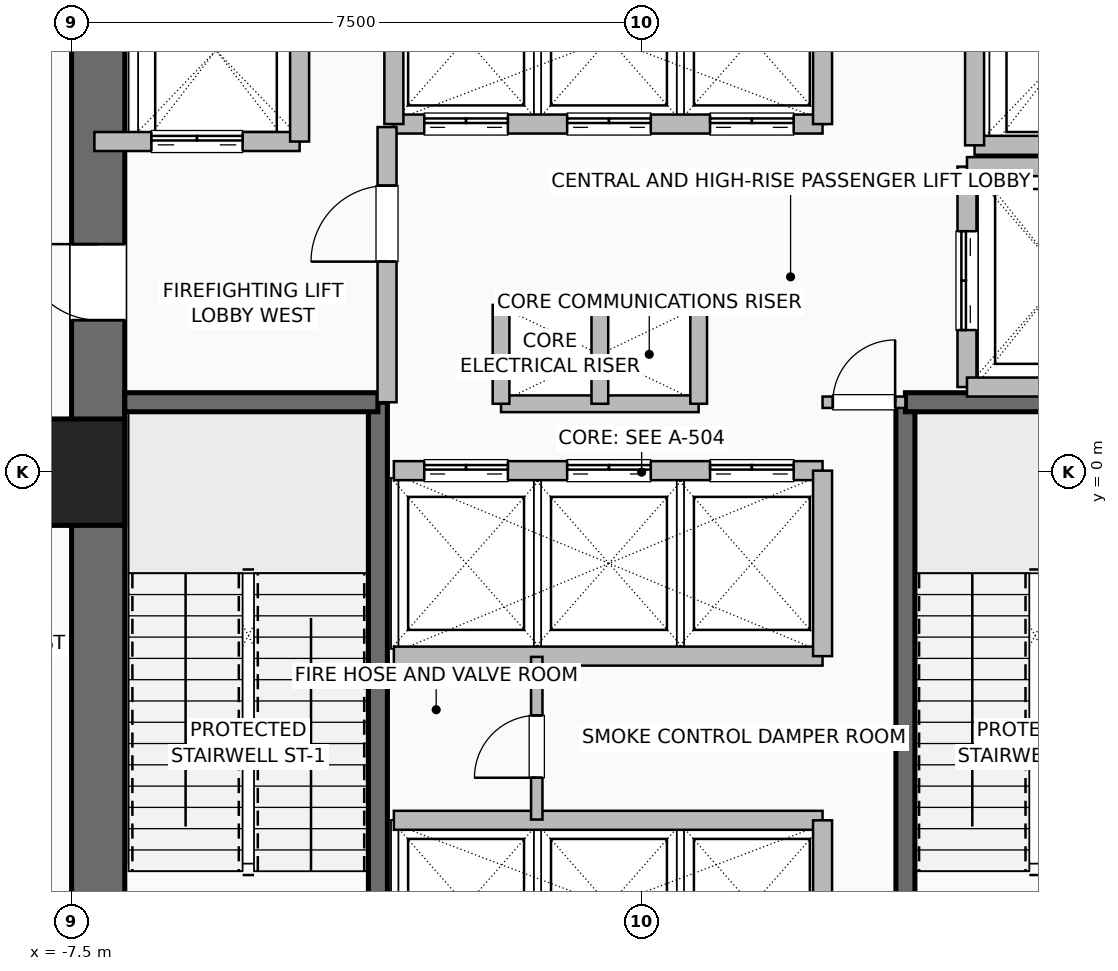
"""IFC4 building model, lengths in metres.
Left out: names, types, materials, properties, quantities, classifications, styles, units other than length and angle.
Written with IfcOpenShell. Run it as: python <this file> out.ifc"""

import sys

from ifc_helpers import new_model, si_unit, direction, frame, frame_2d, origin, origin_2d, place, context, subcontext, project, spatial, rectangle, hollow_rectangle, extrude, element, fill, save


model = new_model("IFC4")
c1 = context("Model", 3, precision=1e-05, world=origin(), true_north=direction((0.0, 1.0)))
c2 = subcontext(c1, "Body", "Model", "MODEL_VIEW")
j1 = project(units=[si_unit("LENGTHUNIT", "METRE"), si_unit("PLANEANGLEUNIT", "RADIAN")], contexts=[c1])
p1 = place(None, origin())
s1 = spatial("IfcSite", under=j1, at=p1, CompositionType="ELEMENT")
p2 = place(p1, origin())
s2 = spatial("IfcBuilding", under=s1, at=p2, CompositionType="ELEMENT")
p3 = place(p2, frame((0.0, 0.0, 5.4)))
s3 = spatial("IfcBuildingStorey", under=s2, at=p3, CompositionType="ELEMENT", Elevation=5.4)
p4 = place(p3, frame((-7.5, 0.0, 0.0), z_axis=(0.0, 0.0, 1.0), x_axis=(1.0, 0.0, 0.0)))
e1 = element("IfcColumn", 1, at=p4, inside=s3, PredefinedType="COLUMN", context=c2, shape_type="SweptSolid", body=[
    extrude(hollow_rectangle(XDim=1.4, YDim=1.4, WallThickness=0.06, at=origin_2d()), origin(), (0.0, 0.0, 1.0), 5.4),
])
p5 = place(p3, frame((-7.15, -7.5, 0.0), z_axis=(0.0, 0.0, 1.0), x_axis=(0.0, 1.0, 0.0)))
e2 = element("IfcWall", 2, at=p5, inside=s3, PredefinedType="SHEAR", context=c2, shape_type="SweptSolid", body=[
    extrude(rectangle(XDim=15.0, YDim=0.7, at=frame_2d((7.5, 0.0))), origin(), (0.0, 0.0, 1.0), 5.0),
])
p6 = place(p5, frame((9.5, 0.0, 0.0)))
e3 = element("IfcOpeningElement", 3, at=p6, cuts=e2, PredefinedType="OPENING", context=c2, shape_type="SweptSolid", body=[
    extrude(rectangle(XDim=1.0, YDim=2.08, at=frame_2d((0.5, 1.04))), frame((0.0, 0.36, 0.0), z_axis=(0.0, -1.0, 0.0), x_axis=(1.0, 0.0, 0.0)), (0.0, 0.0, 1.0), 0.72),
])
p7 = place(p3, frame((-3.47, -6.8, 0.0), z_axis=(0.0, 0.0, 1.0), x_axis=(0.0, 1.0, 0.0)))
e4 = element("IfcWall", 4, at=p7, inside=s3, PredefinedType="SHEAR", context=c2, shape_type="SweptSolid", body=[
    extrude(rectangle(XDim=7.72, YDim=0.25, at=frame_2d((3.86, 0.0))), origin(), (0.0, 0.0, 1.0), 5.0),
])
p8 = place(p3, frame((-6.8, 0.92, 0.0), z_axis=(0.0, 0.0, 1.0), x_axis=(1.0, 0.0, 0.0)))
e5 = element("IfcWall", 5, at=p8, inside=s3, PredefinedType="SHEAR", context=c2, shape_type="SweptSolid", body=[
    extrude(rectangle(XDim=3.33, YDim=0.25, at=frame_2d((1.665, 0.0))), origin(), (0.0, 0.0, 1.0), 5.0),
])
p9 = place(p3, frame((3.47, -6.8, 0.0), z_axis=(0.0, 0.0, 1.0), x_axis=(0.0, 1.0, 0.0)))
e6 = element("IfcWall", 6, at=p9, inside=s3, PredefinedType="SHEAR", context=c2, shape_type="SweptSolid", body=[
    extrude(rectangle(XDim=7.72, YDim=0.25, at=frame_2d((3.86, 0.0))), origin(), (0.0, 0.0, 1.0), 5.0),
])
p10 = place(p3, frame((3.47, 0.92, 0.0), z_axis=(0.0, 0.0, 1.0), x_axis=(1.0, 0.0, 0.0)))
e7 = element("IfcWall", 7, at=p10, inside=s3, PredefinedType="SHEAR", context=c2, shape_type="SweptSolid", body=[
    extrude(rectangle(XDim=3.33, YDim=0.25, at=frame_2d((1.665, 0.0))), origin(), (0.0, 0.0, 1.0), 5.0),
])
for number, where, z_axis, x_axis in (
    (8, (-1.85, 2.2, 0.0), (0.0, 0.0, 1.0), (1.0, 0.0, 0.0)),
    (9, (-1.85, 0.9, 0.0), (0.0, 0.0, 1.0), (1.0, 0.0, 0.0)),
):
    element("IfcWall", number, at=place(p3, frame(where, z_axis=z_axis, x_axis=x_axis)), inside=s3, PredefinedType="PARTITIONING", context=c2, shape_type="SweptSolid", body=[
        extrude(rectangle(XDim=2.6, YDim=0.22, at=frame_2d((1.3, 0.0))), origin(), (0.0, 0.0, 1.0), 5.0),
    ])
for number, where, z_axis, x_axis in (
    (10, (-0.55, 0.9, 0.0), (0.0, 0.0, 1.0), (0.0, 1.0, 0.0)),
    (11, (0.75, 0.9, 0.0), (0.0, 0.0, 1.0), (0.0, 1.0, 0.0)),
    (12, (-1.85, 0.9, 0.0), (0.0, 0.0, 1.0), (0.0, 1.0, 0.0)),
):
    element("IfcWall", number, at=place(p3, frame(where, z_axis=z_axis, x_axis=x_axis)), inside=s3, PredefinedType="PARTITIONING", context=c2, shape_type="SweptSolid", body=[
        extrude(rectangle(XDim=1.3, YDim=0.22, at=frame_2d((0.65, 0.0))), origin(), (0.0, 0.0, 1.0), 5.0),
    ])
p11 = place(p3, frame((-3.26, -4.58, 0.0), z_axis=(0.0, 0.0, 1.0), x_axis=(1.0, 0.0, 0.0)))
e13 = element("IfcWall", 13, at=p11, inside=s3, PredefinedType="SHEAR", context=c2, shape_type="SweptSolid", body=[
    extrude(rectangle(XDim=5.64, YDim=0.25, at=frame_2d((2.82, 0.0))), origin(), (0.0, 0.0, 1.0), 5.0),
])
p12 = place(p3, frame((2.38, -6.8, 0.0), z_axis=(0.0, 0.0, 1.0), x_axis=(0.0, 1.0, 0.0)))
e14 = element("IfcWall", 14, at=p12, inside=s3, PredefinedType="SHEAR", context=c2, shape_type="SweptSolid", body=[
    extrude(rectangle(XDim=2.22, YDim=0.25, at=frame_2d((1.11, 0.0))), origin(), (0.0, 0.0, 1.0), 5.0),
])
p13 = place(p3, frame((-3.26, 0.02, 0.0), z_axis=(0.0, 0.0, 1.0), x_axis=(1.0, 0.0, 0.0)))
e15 = element("IfcWall", 15, at=p13, inside=s3, PredefinedType="SHEAR", context=c2, shape_type="SweptSolid", body=[
    extrude(rectangle(XDim=5.64, YDim=0.25, at=frame_2d((2.82, 0.0))), origin(), (0.0, 0.0, 1.0), 5.0),
])
p14 = place(p13, frame((0.4, 0.0, 0.0)))
e16 = element("IfcOpeningElement", 16, at=p14, cuts=e15, PredefinedType="OPENING", context=c2, shape_type="SweptSolid", body=[
    extrude(rectangle(XDim=1.1, YDim=2.2, at=frame_2d((0.55, 1.1))), frame((0.0, 0.135, 0.0), z_axis=(0.0, -1.0, 0.0), x_axis=(1.0, 0.0, 0.0)), (0.0, 0.0, 1.0), 0.27),
])
p15 = place(p13, frame((2.28, 0.0, 0.0)))
e17 = element("IfcOpeningElement", 17, at=p15, cuts=e15, PredefinedType="OPENING", context=c2, shape_type="SweptSolid", body=[
    extrude(rectangle(XDim=1.1, YDim=2.2, at=frame_2d((0.55, 1.1))), frame((0.0, 0.135, 0.0), z_axis=(0.0, -1.0, 0.0), x_axis=(1.0, 0.0, 0.0)), (0.0, 0.0, 1.0), 0.27),
])
p16 = place(p13, frame((4.16, 0.0, 0.0)))
e18 = element("IfcOpeningElement", 18, at=p16, cuts=e15, PredefinedType="OPENING", context=c2, shape_type="SweptSolid", body=[
    extrude(rectangle(XDim=1.1, YDim=2.2, at=frame_2d((0.55, 1.1))), frame((0.0, 0.135, 0.0), z_axis=(0.0, -1.0, 0.0), x_axis=(1.0, 0.0, 0.0)), (0.0, 0.0, 1.0), 0.27),
])
p17 = place(p3, frame((-3.26, -2.42, 0.0), z_axis=(0.0, 0.0, 1.0), x_axis=(1.0, 0.0, 0.0)))
e19 = element("IfcWall", 19, at=p17, inside=s3, PredefinedType="SHEAR", context=c2, shape_type="SweptSolid", body=[
    extrude(rectangle(XDim=5.64, YDim=0.25, at=frame_2d((2.82, 0.0))), origin(), (0.0, 0.0, 1.0), 5.0),
])
p18 = place(p3, frame((2.38, -2.42, 0.0), z_axis=(0.0, 0.0, 1.0), x_axis=(0.0, 1.0, 0.0)))
e20 = element("IfcWall", 20, at=p18, inside=s3, PredefinedType="SHEAR", context=c2, shape_type="SweptSolid", body=[
    extrude(rectangle(XDim=2.44, YDim=0.25, at=frame_2d((1.22, 0.0))), origin(), (0.0, 0.0, 1.0), 5.0),
])
p19 = place(p3, frame((-3.26, 4.58, 0.0), z_axis=(0.0, 0.0, 1.0), x_axis=(1.0, 0.0, 0.0)))
e21 = element("IfcWall", 21, at=p19, inside=s3, PredefinedType="SHEAR", context=c2, shape_type="SweptSolid", body=[
    extrude(rectangle(XDim=5.64, YDim=0.25, at=frame_2d((2.82, 0.0))), origin(), (0.0, 0.0, 1.0), 5.0),
])
p20 = place(p19, frame((0.4, 0.0, 0.0)))
e22 = element("IfcOpeningElement", 22, at=p20, cuts=e21, PredefinedType="OPENING", context=c2, shape_type="SweptSolid", body=[
    extrude(rectangle(XDim=1.1, YDim=2.2, at=frame_2d((0.55, 1.1))), frame((0.0, 0.135, 0.0), z_axis=(0.0, -1.0, 0.0), x_axis=(1.0, 0.0, 0.0)), (0.0, 0.0, 1.0), 0.27),
])
p21 = place(p19, frame((2.28, 0.0, 0.0)))
e23 = element("IfcOpeningElement", 23, at=p21, cuts=e21, PredefinedType="OPENING", context=c2, shape_type="SweptSolid", body=[
    extrude(rectangle(XDim=1.1, YDim=2.2, at=frame_2d((0.55, 1.1))), frame((0.0, 0.135, 0.0), z_axis=(0.0, -1.0, 0.0), x_axis=(1.0, 0.0, 0.0)), (0.0, 0.0, 1.0), 0.27),
])
p22 = place(p19, frame((4.16, 0.0, 0.0)))
e24 = element("IfcOpeningElement", 24, at=p22, cuts=e21, PredefinedType="OPENING", context=c2, shape_type="SweptSolid", body=[
    extrude(rectangle(XDim=1.1, YDim=2.2, at=frame_2d((0.55, 1.1))), frame((0.0, 0.135, 0.0), z_axis=(0.0, -1.0, 0.0), x_axis=(1.0, 0.0, 0.0)), (0.0, 0.0, 1.0), 0.27),
])
for number, where, z_axis, x_axis in (
    (25, (-3.26, 4.58, 0.0), (0.0, 0.0, 1.0), (0.0, 1.0, 0.0)),
    (26, (2.38, 4.58, 0.0), (0.0, 0.0, 1.0), (0.0, 1.0, 0.0)),
):
    element("IfcWall", number, at=place(p3, frame(where, z_axis=z_axis, x_axis=x_axis)), inside=s3, PredefinedType="SHEAR", context=c2, shape_type="SweptSolid", body=[
        extrude(rectangle(XDim=2.22, YDim=0.25, at=frame_2d((1.11, 0.0))), origin(), (0.0, 0.0, 1.0), 5.0),
    ])
p23 = place(p3, frame((-7.2, 4.35, 0.0), z_axis=(0.0, 0.0, 1.0), x_axis=(1.0, 0.0, 0.0)))
e27 = element("IfcWall", 27, at=p23, inside=s3, PredefinedType="SHEAR", context=c2, shape_type="SweptSolid", body=[
    extrude(rectangle(XDim=2.7, YDim=0.25, at=frame_2d((1.35, 0.0))), origin(), (0.0, 0.0, 1.0), 5.0),
])
p24 = place(p23, frame((0.75, 0.0, 0.0)))
e28 = element("IfcOpeningElement", 28, at=p24, cuts=e27, PredefinedType="OPENING", context=c2, shape_type="SweptSolid", body=[
    extrude(rectangle(XDim=1.2, YDim=2.2, at=frame_2d((0.6, 1.1))), frame((0.0, 0.135, 0.0), z_axis=(0.0, -1.0, 0.0), x_axis=(1.0, 0.0, 0.0)), (0.0, 0.0, 1.0), 0.27),
])
p25 = place(p3, frame((-4.5, 4.35, 0.0), z_axis=(0.0, 0.0, 1.0), x_axis=(0.0, 1.0, 0.0)))
e29 = element("IfcWall", 29, at=p25, inside=s3, PredefinedType="SHEAR", context=c2, shape_type="SweptSolid", body=[
    extrude(rectangle(XDim=2.85, YDim=0.25, at=frame_2d((1.425, 0.0))), origin(), (0.0, 0.0, 1.0), 5.0),
])
p26 = place(p3, frame((4.38, 4.3, 0.0), z_axis=(0.0, 0.0, 1.0), x_axis=(1.0, 0.0, 0.0)))
e30 = element("IfcWall", 30, at=p26, inside=s3, PredefinedType="SHEAR", context=c2, shape_type="SweptSolid", body=[
    extrude(rectangle(XDim=2.42, YDim=0.25, at=frame_2d((1.21, 0.0))), origin(), (0.0, 0.0, 1.0), 5.0),
])
p27 = place(p3, frame((4.38, 4.3, 0.0), z_axis=(0.0, 0.0, 1.0), x_axis=(0.0, 1.0, 0.0)))
e31 = element("IfcWall", 31, at=p27, inside=s3, PredefinedType="SHEAR", context=c2, shape_type="SweptSolid", body=[
    extrude(rectangle(XDim=2.5, YDim=0.25, at=frame_2d((1.25, 0.0))), origin(), (0.0, 0.0, 1.0), 5.0),
])
p28 = place(p3, frame((4.28, 1.12, 0.0), z_axis=(0.0, 0.0, 1.0), x_axis=(0.0, 1.0, 0.0)))
e32 = element("IfcWall", 32, at=p28, inside=s3, PredefinedType="SHEAR", context=c2, shape_type="SweptSolid", body=[
    extrude(rectangle(XDim=2.9, YDim=0.25, at=frame_2d((1.45, 0.0))), origin(), (0.0, 0.0, 1.0), 5.0),
])
p29 = place(p28, frame((0.75, 0.0, 0.0)))
e33 = element("IfcOpeningElement", 33, at=p29, cuts=e32, PredefinedType="OPENING", context=c2, shape_type="SweptSolid", body=[
    extrude(rectangle(XDim=1.3, YDim=2.3, at=frame_2d((0.65, 1.15))), frame((0.0, 0.135, 0.0), z_axis=(0.0, -1.0, 0.0), x_axis=(1.0, 0.0, 0.0)), (0.0, 0.0, 1.0), 0.27),
])
for number, where, z_axis, x_axis in (
    (34, (4.28, 1.12, 0.0), (0.0, 0.0, 1.0), (1.0, 0.0, 0.0)),
    (35, (4.28, 4.02, 0.0), (0.0, 0.0, 1.0), (1.0, 0.0, 0.0)),
):
    element("IfcWall", number, at=place(p3, frame(where, z_axis=z_axis, x_axis=x_axis)), inside=s3, PredefinedType="SHEAR", context=c2, shape_type="SweptSolid", body=[
        extrude(rectangle(XDim=2.52, YDim=0.25, at=frame_2d((1.26, 0.0))), origin(), (0.0, 0.0, 1.0), 5.0),
    ])
p30 = place(p3, frame((-3.35, 0.92, 0.0), z_axis=(0.0, 0.0, 1.0), x_axis=(0.0, 1.0, 0.0)))
e36 = element("IfcWall", 36, at=p30, inside=s3, PredefinedType="SHEAR", context=c2, shape_type="SweptSolid", body=[
    extrude(rectangle(XDim=3.62, YDim=0.25, at=frame_2d((1.81, 0.0))), origin(), (0.0, 0.0, 1.0), 5.0),
])
p31 = place(p30, frame((1.85, 0.0, 0.0)))
e37 = element("IfcOpeningElement", 37, at=p31, cuts=e36, PredefinedType="OPENING", context=c2, shape_type="SweptSolid", body=[
    extrude(rectangle(XDim=1.0, YDim=2.08, at=frame_2d((0.5, 1.04))), frame((0.0, 0.135, 0.0), z_axis=(0.0, -1.0, 0.0), x_axis=(1.0, 0.0, 0.0)), (0.0, 0.0, 1.0), 0.27),
])
p32 = place(p3, frame((2.38, 0.92, 0.0), z_axis=(0.0, 0.0, 1.0), x_axis=(1.0, 0.0, 0.0)))
e38 = element("IfcWall", 38, at=p32, inside=s3, PredefinedType="PARTITIONING", context=c2, shape_type="SweptSolid", body=[
    extrude(rectangle(XDim=1.09, YDim=0.15, at=frame_2d((0.545, 0.0))), origin(), (0.0, 0.0, 1.0), 5.0),
])
p33 = place(p32, frame((0.135, 0.0, 0.0)))
e39 = element("IfcOpeningElement", 39, at=p33, cuts=e38, PredefinedType="OPENING", context=c2, shape_type="SweptSolid", body=[
    extrude(rectangle(XDim=0.82, YDim=2.05, at=frame_2d((0.41, 1.025))), frame((0.0, 0.085, 0.0), z_axis=(0.0, -1.0, 0.0), x_axis=(1.0, 0.0, 0.0)), (0.0, 0.0, 1.0), 0.17),
])
p34 = place(p3, frame((-1.38, -4.57, 0.0), z_axis=(0.0, 0.0, 1.0), x_axis=(0.0, 1.0, 0.0)))
e40 = element("IfcWall", 40, at=p34, inside=s3, PredefinedType="PARTITIONING", context=c2, shape_type="SweptSolid", body=[
    extrude(rectangle(XDim=2.14, YDim=0.15, at=frame_2d((1.07, 0.0))), origin(), (0.0, 0.0, 1.0), 5.0),
])
p35 = place(p34, frame((0.55, 0.0, 0.0)))
e41 = element("IfcOpeningElement", 41, at=p35, cuts=e40, PredefinedType="OPENING", context=c2, shape_type="SweptSolid", body=[
    extrude(rectangle(XDim=0.82, YDim=2.05, at=frame_2d((0.41, 1.025))), frame((0.0, 0.085, 0.0), z_axis=(0.0, -1.0, 0.0), x_axis=(1.0, 0.0, 0.0)), (0.0, 0.0, 1.0), 0.17),
])
p36 = place(p6, origin())
e42 = element("IfcDoor", 42, at=p36, inside=s3, OperationType="SINGLE_SWING_RIGHT", PredefinedType="DOOR", context=c2, shape_type="SweptSolid", body=[
    extrude(rectangle(XDim=1.0, YDim=2.08, at=frame_2d((0.5, 1.04))), frame((0.0, 0.025, 0.0), z_axis=(0.0, -1.0, 0.0), x_axis=(1.0, 0.0, 0.0)), (0.0, 0.0, 1.0), 0.05),
])
fill(e3, e42)
p37 = place(p14, origin())
e43 = element("IfcDoor", 43, at=p37, inside=s3, OperationType="DOUBLE_DOOR_SLIDING", PredefinedType="DOOR", context=c2, shape_type="SweptSolid", body=[
    extrude(rectangle(XDim=1.1, YDim=2.2, at=frame_2d((0.55, 1.1))), frame((0.0, 0.025, 0.0), z_axis=(0.0, -1.0, 0.0), x_axis=(1.0, 0.0, 0.0)), (0.0, 0.0, 1.0), 0.05),
])
fill(e16, e43)
p38 = place(p15, origin())
e44 = element("IfcDoor", 44, at=p38, inside=s3, OperationType="DOUBLE_DOOR_SLIDING", PredefinedType="DOOR", context=c2, shape_type="SweptSolid", body=[
    extrude(rectangle(XDim=1.1, YDim=2.2, at=frame_2d((0.55, 1.1))), frame((0.0, 0.025, 0.0), z_axis=(0.0, -1.0, 0.0), x_axis=(1.0, 0.0, 0.0)), (0.0, 0.0, 1.0), 0.05),
])
fill(e17, e44)
p39 = place(p16, origin())
e45 = element("IfcDoor", 45, at=p39, inside=s3, OperationType="DOUBLE_DOOR_SLIDING", PredefinedType="DOOR", context=c2, shape_type="SweptSolid", body=[
    extrude(rectangle(XDim=1.1, YDim=2.2, at=frame_2d((0.55, 1.1))), frame((0.0, 0.025, 0.0), z_axis=(0.0, -1.0, 0.0), x_axis=(1.0, 0.0, 0.0)), (0.0, 0.0, 1.0), 0.05),
])
fill(e18, e45)
p40 = place(p20, origin())
e46 = element("IfcDoor", 46, at=p40, inside=s3, OperationType="DOUBLE_DOOR_SLIDING", PredefinedType="DOOR", context=c2, shape_type="SweptSolid", body=[
    extrude(rectangle(XDim=1.1, YDim=2.2, at=frame_2d((0.55, 1.1))), frame((0.0, 0.025, 0.0), z_axis=(0.0, -1.0, 0.0), x_axis=(1.0, 0.0, 0.0)), (0.0, 0.0, 1.0), 0.05),
])
fill(e22, e46)
p41 = place(p21, origin())
e47 = element("IfcDoor", 47, at=p41, inside=s3, OperationType="DOUBLE_DOOR_SLIDING", PredefinedType="DOOR", context=c2, shape_type="SweptSolid", body=[
    extrude(rectangle(XDim=1.1, YDim=2.2, at=frame_2d((0.55, 1.1))), frame((0.0, 0.025, 0.0), z_axis=(0.0, -1.0, 0.0), x_axis=(1.0, 0.0, 0.0)), (0.0, 0.0, 1.0), 0.05),
])
fill(e23, e47)
p42 = place(p22, origin())
e48 = element("IfcDoor", 48, at=p42, inside=s3, OperationType="DOUBLE_DOOR_SLIDING", PredefinedType="DOOR", context=c2, shape_type="SweptSolid", body=[
    extrude(rectangle(XDim=1.1, YDim=2.2, at=frame_2d((0.55, 1.1))), frame((0.0, 0.025, 0.0), z_axis=(0.0, -1.0, 0.0), x_axis=(1.0, 0.0, 0.0)), (0.0, 0.0, 1.0), 0.05),
])
fill(e24, e48)
p43 = place(p24, origin())
e49 = element("IfcDoor", 49, at=p43, inside=s3, OperationType="DOUBLE_DOOR_SLIDING", PredefinedType="DOOR", context=c2, shape_type="SweptSolid", body=[
    extrude(rectangle(XDim=1.2, YDim=2.2, at=frame_2d((0.6, 1.1))), frame((0.0, 0.025, 0.0), z_axis=(0.0, -1.0, 0.0), x_axis=(1.0, 0.0, 0.0)), (0.0, 0.0, 1.0), 0.05),
])
fill(e28, e49)
p44 = place(p29, origin())
e50 = element("IfcDoor", 50, at=p44, inside=s3, OperationType="DOUBLE_DOOR_SLIDING", PredefinedType="DOOR", context=c2, shape_type="SweptSolid", body=[
    extrude(rectangle(XDim=1.3, YDim=2.3, at=frame_2d((0.65, 1.15))), frame((0.0, 0.025, 0.0), z_axis=(0.0, -1.0, 0.0), x_axis=(1.0, 0.0, 0.0)), (0.0, 0.0, 1.0), 0.05),
])
fill(e33, e50)
p45 = place(p31, origin())
e51 = element("IfcDoor", 51, at=p45, inside=s3, OperationType="SINGLE_SWING_LEFT", PredefinedType="DOOR", context=c2, shape_type="SweptSolid", body=[
    extrude(rectangle(XDim=1.0, YDim=2.08, at=frame_2d((0.5, 1.04))), frame((0.0, 0.025, 0.0), z_axis=(0.0, -1.0, 0.0), x_axis=(1.0, 0.0, 0.0)), (0.0, 0.0, 1.0), 0.05),
])
fill(e37, e51)
p46 = place(p33, origin())
e52 = element("IfcDoor", 52, at=p46, inside=s3, OperationType="SINGLE_SWING_RIGHT", PredefinedType="DOOR", context=c2, shape_type="SweptSolid", body=[
    extrude(rectangle(XDim=0.82, YDim=2.05, at=frame_2d((0.41, 1.025))), frame((0.0, 0.025, 0.0), z_axis=(0.0, -1.0, 0.0), x_axis=(1.0, 0.0, 0.0)), (0.0, 0.0, 1.0), 0.05),
])
fill(e39, e52)
p47 = place(p35, origin())
e53 = element("IfcDoor", 53, at=p47, inside=s3, OperationType="SINGLE_SWING_LEFT", PredefinedType="DOOR", context=c2, shape_type="SweptSolid", body=[
    extrude(rectangle(XDim=0.82, YDim=2.05, at=frame_2d((0.41, 1.025))), frame((0.0, 0.025, 0.0), z_axis=(0.0, -1.0, 0.0), x_axis=(1.0, 0.0, 0.0)), (0.0, 0.0, 1.0), 0.05),
])
fill(e41, e53)
save(model, sys.argv[1])
